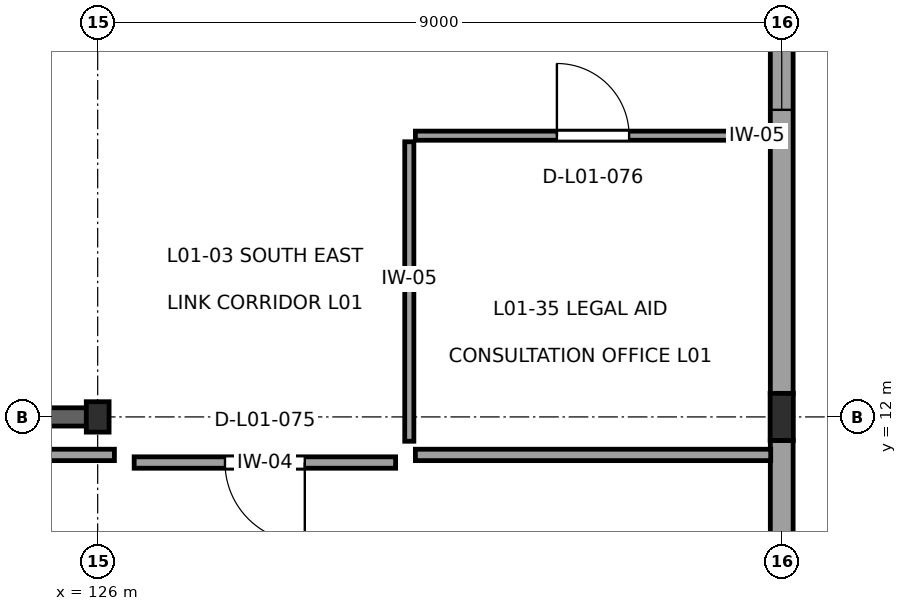
"""IFC4 building model, lengths in metres.
Left out: names, types, materials, properties, quantities, classifications, styles, units other than length and angle.
Written with IfcOpenShell. Run it as: python <this file> out.ifc"""

import sys

from ifc_helpers import new_model, si_unit, direction, frame, frame_2d, origin, origin_2d, place, context, subcontext, project, spatial, rectangle, i_section, extrude, element, fill, save


model = new_model("IFC4")
c1 = context("Model", 3, precision=1e-05, world=origin(), true_north=direction((0.0, 1.0)))
c2 = subcontext(c1, "Body", "Model", "MODEL_VIEW")
j1 = project(units=[si_unit("LENGTHUNIT", "METRE"), si_unit("PLANEANGLEUNIT", "RADIAN")], contexts=[c1])
p1 = place(None, origin())
s1 = spatial("IfcSite", under=j1, at=p1, CompositionType="ELEMENT")
p2 = place(p1, origin())
s2 = spatial("IfcBuilding", under=s1, at=p2, CompositionType="ELEMENT")
p3 = place(p2, frame((0.0, 0.0, 5.4)))
s3 = spatial("IfcBuildingStorey", under=s2, at=p3, CompositionType="ELEMENT", Elevation=5.4)
p4 = place(p3, frame((126.0, 12.0, 0.0), z_axis=(0.0, 0.0, 1.0), x_axis=(1.0, 0.0, 0.0)))
e1 = element("IfcColumn", 1, at=p4, inside=s3, PredefinedType="COLUMN", context=c2, shape_type="SweptSolid", body=[
    extrude(i_section(OverallWidth=0.3, OverallDepth=0.4, WebThickness=0.013, FlangeThickness=0.024, at=origin_2d()), origin(), (0.0, 0.0, 1.0), 4.5),
])
p5 = place(p3, frame((135.0, 12.0, 0.0), z_axis=(0.0, 0.0, 1.0), x_axis=(1.0, 0.0, 0.0)))
e2 = element("IfcColumn", 2, at=p5, inside=s3, PredefinedType="COLUMN", context=c2, shape_type="SweptSolid", body=[
    extrude(i_section(OverallWidth=0.305, OverallDepth=0.62, WebThickness=0.021, FlangeThickness=0.04, at=origin_2d()), origin(), (0.0, 0.0, 1.0), 4.5),
])
p6 = place(p3, frame((135.0, 0.008, 0.0), z_axis=(0.0, 0.0, 1.0), x_axis=(0.0, 1.0, 0.0)))
e3 = element("IfcWall", 3, at=p6, inside=s3, PredefinedType="SOLIDWALL", context=c2, shape_type="SweptSolid", body=[
    extrude(rectangle(XDim=11.684, YDim=0.3, at=frame_2d((5.842, 0.0))), origin(), (0.0, 0.0, 1.0), 3.575),
])
p7 = place(p6, frame((1.452, 0.0, 0.8)))
e4 = element("IfcOpeningElement", 4, at=p7, cuts=e3, PredefinedType="OPENING", context=c2, shape_type="SweptSolid", body=[
    extrude(rectangle(XDim=2.0, YDim=2.0, at=frame_2d((1.0, 1.0))), frame((0.0, 0.165, 0.0), z_axis=(0.0, -1.0, 0.0), x_axis=(1.0, 0.0, 0.0)), (0.0, 0.0, 1.0), 0.33),
])
p8 = place(p6, frame((7.412, 0.0, 0.8)))
e5 = element("IfcOpeningElement", 5, at=p8, cuts=e3, PredefinedType="OPENING", context=c2, shape_type="SweptSolid", body=[
    extrude(rectangle(XDim=2.0, YDim=2.0, at=frame_2d((1.0, 1.0))), frame((0.0, 0.165, 0.0), z_axis=(0.0, -1.0, 0.0), x_axis=(1.0, 0.0, 0.0)), (0.0, 0.0, 1.0), 0.33),
])
p9 = place(p3, frame((135.0, 12.308, 0.0), z_axis=(0.0, 0.0, 1.0), x_axis=(0.0, 1.0, 0.0)))
e6 = element("IfcWall", 6, at=p9, inside=s3, PredefinedType="SOLIDWALL", context=c2, shape_type="SweptSolid", body=[
    extrude(rectangle(XDim=11.336, YDim=0.3, at=frame_2d((5.668, 0.0))), origin(), (0.0, 0.0, 1.0), 3.575),
])
p10 = place(p9, frame((3.732, 0.0, 0.8)))
e7 = element("IfcOpeningElement", 7, at=p10, cuts=e6, PredefinedType="OPENING", context=c2, shape_type="SweptSolid", body=[
    extrude(rectangle(XDim=2.0, YDim=2.0, at=frame_2d((1.0, 1.0))), frame((0.0, 0.165, 0.0), z_axis=(0.0, -1.0, 0.0), x_axis=(1.0, 0.0, 0.0)), (0.0, 0.0, 1.0), 0.33),
])
p11 = place(p9, frame((7.162, 0.0, 0.8)))
e8 = element("IfcOpeningElement", 8, at=p11, cuts=e6, PredefinedType="OPENING", context=c2, shape_type="SweptSolid", body=[
    extrude(rectangle(XDim=2.0, YDim=2.0, at=frame_2d((1.0, 1.0))), frame((0.0, 0.165, 0.0), z_axis=(0.0, -1.0, 0.0), x_axis=(1.0, 0.0, 0.0)), (0.0, 0.0, 1.0), 0.33),
])
p12 = place(p3, frame((117.248, 12.0, 0.0), z_axis=(0.0, 0.0, 1.0), x_axis=(1.0, 0.0, 0.0)))
e9 = element("IfcWall", 9, at=p12, inside=s3, PredefinedType="SHEAR", context=c2, shape_type="SweptSolid", body=[
    extrude(rectangle(XDim=8.744, YDim=0.24, at=frame_2d((4.372, 0.0))), origin(), (0.0, 0.0, 1.0), 3.585),
])
p13 = place(p3, frame((130.18, 11.5, 0.0), z_axis=(0.0, 0.0, 1.0), x_axis=(1.0, 0.0, 0.0)))
e10 = element("IfcWall", 10, at=p13, inside=s3, PredefinedType="PARTITIONING", context=c2, shape_type="SweptSolid", body=[
    extrude(rectangle(XDim=4.675, YDim=0.15, at=frame_2d((2.337, 0.0))), origin(), (0.0, 0.0, 1.0), 4.14),
])
p14 = place(p3, frame((116.795, 11.5, 0.0), z_axis=(0.0, 0.0, 1.0), x_axis=(1.0, 0.0, 0.0)))
e11 = element("IfcWall", 11, at=p14, inside=s3, PredefinedType="PARTITIONING", context=c2, shape_type="SweptSolid", body=[
    extrude(rectangle(XDim=9.425, YDim=0.15, at=frame_2d((4.712, 0.0))), origin(), (0.0, 0.0, 1.0), 4.14),
])
p15 = place(p3, frame((126.48, 11.4, 0.0), z_axis=(0.0, 0.0, 1.0), x_axis=(1.0, 0.0, 0.0)))
e12 = element("IfcWall", 12, at=p15, inside=s3, PredefinedType="PARTITIONING", context=c2, shape_type="SweptSolid", body=[
    extrude(rectangle(XDim=3.44, YDim=0.15, at=frame_2d((1.72, 0.0))), origin(), (0.0, 0.0, 1.0), 4.14),
])
p16 = place(p15, frame((1.195, 0.0, 0.0)))
e13 = element("IfcOpeningElement", 13, at=p16, cuts=e12, PredefinedType="OPENING", context=c2, shape_type="SweptSolid", body=[
    extrude(rectangle(XDim=1.05, YDim=2.25, at=frame_2d((0.525, 1.125))), frame((0.0, 0.09, 0.0), z_axis=(0.0, -1.0, 0.0), x_axis=(1.0, 0.0, 0.0)), (0.0, 0.0, 1.0), 0.18),
])
p17 = place(p3, frame((130.1, 11.68, 0.0), z_axis=(0.0, 0.0, 1.0), x_axis=(0.0, 1.0, 0.0)))
e14 = element("IfcWall", 14, at=p17, inside=s3, PredefinedType="PARTITIONING", context=c2, shape_type="SweptSolid", body=[
    extrude(rectangle(XDim=3.94, YDim=0.12, at=frame_2d((1.97, 0.0))), origin(), (0.0, 0.0, 1.0), 4.14),
])
p18 = place(p3, frame((130.18, 15.7, 0.0), z_axis=(0.0, 0.0, 1.0), x_axis=(1.0, 0.0, 0.0)))
e15 = element("IfcWall", 15, at=p18, inside=s3, PredefinedType="PARTITIONING", context=c2, shape_type="SweptSolid", body=[
    extrude(rectangle(XDim=4.675, YDim=0.12, at=frame_2d((2.337, 0.0))), origin(), (0.0, 0.0, 1.0), 4.14),
])
p19 = place(p18, frame((1.862, 0.0, 0.0)))
e16 = element("IfcOpeningElement", 16, at=p19, cuts=e15, PredefinedType="OPENING", context=c2, shape_type="SweptSolid", body=[
    extrude(rectangle(XDim=0.95, YDim=2.15, at=frame_2d((0.475, 1.075))), frame((0.0, 0.075, 0.0), z_axis=(0.0, -1.0, 0.0), x_axis=(1.0, 0.0, 0.0)), (0.0, 0.0, 1.0), 0.15),
])
p20 = place(p10, origin())
e17 = element("IfcWindow", 17, at=p20, inside=s3, PartitioningType="SINGLE_PANEL", PredefinedType="WINDOW", context=c2, shape_type="SweptSolid", body=[
    extrude(rectangle(XDim=2.0, YDim=2.0, at=frame_2d((1.0, 1.0))), frame((0.0, 0.03, 0.0), z_axis=(0.0, -1.0, 0.0), x_axis=(1.0, 0.0, 0.0)), (0.0, 0.0, 1.0), 0.06),
])
fill(e7, e17)
p21 = place(p16, frame((1.05, 0.0, 0.0), z_axis=(0.0, 0.0, 1.0), x_axis=(-1.0, 0.0, 0.0)))
e18 = element("IfcDoor", 18, at=p21, inside=s3, OperationType="SINGLE_SWING_RIGHT", PredefinedType="DOOR", context=c2, shape_type="SweptSolid", body=[
    extrude(rectangle(XDim=1.05, YDim=2.25, at=frame_2d((0.525, 1.125))), frame((0.0, 0.025, 0.0), z_axis=(0.0, -1.0, 0.0), x_axis=(1.0, 0.0, 0.0)), (0.0, 0.0, 1.0), 0.05),
])
fill(e13, e18)
p22 = place(p19, origin())
e19 = element("IfcDoor", 19, at=p22, inside=s3, OperationType="SINGLE_SWING_LEFT", PredefinedType="DOOR", context=c2, shape_type="SweptSolid", body=[
    extrude(rectangle(XDim=0.95, YDim=2.15, at=frame_2d((0.475, 1.075))), frame((0.0, 0.025, 0.0), z_axis=(0.0, -1.0, 0.0), x_axis=(1.0, 0.0, 0.0)), (0.0, 0.0, 1.0), 0.05),
])
fill(e16, e19)
save(model, sys.argv[1])
